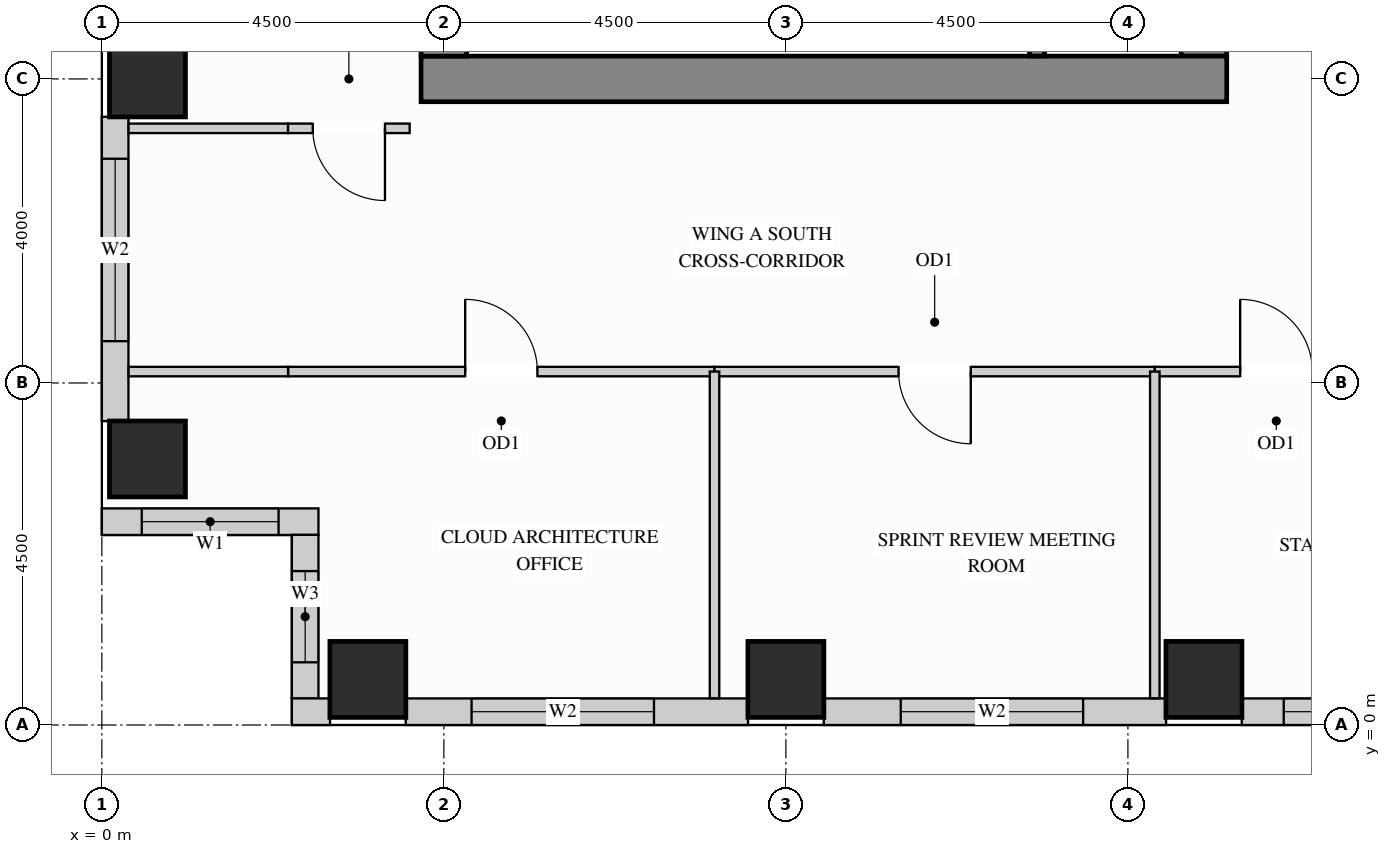
"""IFC4 building model, lengths in metres.
Left out: names, types, materials, properties, quantities, classifications, styles, units other than length and angle.
Written with IfcOpenShell. Run it as: python <this file> out.ifc"""

import sys

from ifc_helpers import new_model, si_unit, direction, frame, frame_2d, origin, origin_2d, place, context, subcontext, project, spatial, rectangle, extrude, source, transform, mapped, element, fill, save


model = new_model("IFC4")
c1 = context("Model", 3, precision=1e-05, world=origin(), true_north=direction((0.0, 1.0)))
c2 = subcontext(c1, "Body", "Model", "MODEL_VIEW")
j1 = project(units=[si_unit("LENGTHUNIT", "METRE"), si_unit("PLANEANGLEUNIT", "RADIAN")], contexts=[c1])
p1 = place(None, origin())
s1 = spatial("IfcSite", under=j1, at=p1, CompositionType="ELEMENT")
p2 = place(p1, origin())
s2 = spatial("IfcBuilding", under=s1, at=p2, CompositionType="ELEMENT")
p3 = place(p2, frame((0.0, 0.0, 193.5)))
s3 = spatial("IfcBuildingStorey", under=s2, at=p3, CompositionType="ELEMENT", Elevation=193.5)
m1 = source(origin(), c2, "Body", "SweptSolid", [
    extrude(rectangle(XDim=1.0, YDim=1.0, at=origin_2d()), origin(), (0.0, 0.0, 1.0), 3.4),
])
for number, where, z_axis, x_axis in (
    (1, (14.5, 0.6, 0.0), (0.0, 0.0, 1.0), (1.0, 0.0, 0.0)),
    (2, (3.5, 0.6, 0.0), (0.0, 0.0, 1.0), (1.0, 0.0, 0.0)),
    (3, (9.0, 0.6, 0.0), (0.0, 0.0, 1.0), (1.0, 0.0, 0.0)),
    (4, (0.6, 3.5, 0.0), (0.0, 0.0, 1.0), (1.0, 0.0, 0.0)),
    (5, (0.6, 8.5, 0.0), (0.0, 0.0, 1.0), (1.0, 0.0, 0.0)),
):
    element("IfcColumn", number, at=place(p3, frame(where, z_axis=z_axis, x_axis=x_axis)), inside=s3, PredefinedType="COLUMN", context=c2, shape_type="MappedRepresentation", body=[
        mapped(m1, transform((0.0, 0.0, 0.0), x_axis=(1.0, 0.0, 0.0), y_axis=(0.0, 1.0, 0.0), z_axis=(0.0, 0.0, 1.0))),
    ])
m2 = source(origin(), c2, "Body", "SweptSolid", [
    extrude(rectangle(XDim=10.02, YDim=0.6, at=frame_2d((5.01, 0.0))), origin(), (0.0, 0.0, 1.0), 3.4),
])
p4 = place(p3, frame((14.5, 8.8, 0.0), z_axis=(0.0, 0.0, 1.0), x_axis=(0.0, 1.0, 0.0)))
e6 = element("IfcWall", 6, at=p4, inside=s3, PredefinedType="SHEAR", context=c2, shape_type="MappedRepresentation", body=[
    mapped(m2, transform((0.0, 0.0, 0.0), x_axis=(1.0, 0.0, 0.0), y_axis=(0.0, 1.0, 0.0), z_axis=(0.0, 0.0, 1.0))),
])
m3 = source(origin(), c2, "Body", "SweptSolid", [
    extrude(rectangle(XDim=10.6, YDim=0.6, at=frame_2d((5.3, 0.0))), origin(), (0.0, 0.0, 1.0), 3.4),
])
p5 = place(p3, frame((4.2, 8.5, 0.0), z_axis=(0.0, 0.0, 1.0), x_axis=(1.0, 0.0, 0.0)))
e7 = element("IfcWall", 7, at=p5, inside=s3, PredefinedType="SHEAR", context=c2, shape_type="MappedRepresentation", body=[
    mapped(m3, transform((0.0, 0.0, 0.0), x_axis=(1.0, 0.0, 0.0), y_axis=(0.0, 1.0, 0.0), z_axis=(0.0, 0.0, 1.0))),
])
m4 = source(origin(), c2, "Body", "SweptSolid", [
    extrude(rectangle(XDim=20.4, YDim=0.6, at=frame_2d((10.2, 0.0))), origin(), (0.0, 0.0, 1.0), 3.4),
])
p6 = place(p3, frame((4.5, 8.8, 0.0), z_axis=(0.0, 0.0, 1.0), x_axis=(0.0, 1.0, 0.0)))
e8 = element("IfcWall", 8, at=p6, inside=s3, PredefinedType="SHEAR", context=c2, shape_type="MappedRepresentation", body=[
    mapped(m4, transform((0.0, 0.0, 0.0), x_axis=(1.0, 0.0, 0.0), y_axis=(0.0, 1.0, 0.0), z_axis=(0.0, 0.0, 1.0))),
])
p7 = place(p3, frame((0.175, 8.002, 0.0), z_axis=(0.0, 0.0, 1.0), x_axis=(0.0, -1.0, 0.0)))
e9 = element("IfcWall", 9, at=p7, inside=s3, PredefinedType="SOLIDWALL", context=c2, shape_type="SweptSolid", body=[
    extrude(rectangle(XDim=4.004, YDim=0.35, at=frame_2d((2.002, 0.0))), origin(), (0.0, 0.0, 1.0), 2.612),
])
p8 = place(p7, frame((0.552, 0.0, 0.78)))
e10 = element("IfcOpeningElement", 10, at=p8, cuts=e9, PredefinedType="OPENING", context=c2, shape_type="SweptSolid", body=[
    extrude(rectangle(XDim=2.4, YDim=1.652, at=frame_2d((1.2, 0.826))), frame((0.0, 0.185, 0.0), z_axis=(0.0, -1.0, 0.0), x_axis=(1.0, 0.0, 0.0)), (0.0, 0.0, 1.0), 0.37),
])
p9 = place(p3, frame((0.0, 2.675, 0.0), z_axis=(0.0, 0.0, 1.0), x_axis=(1.0, 0.0, 0.0)))
e11 = element("IfcWall", 11, at=p9, inside=s3, PredefinedType="SOLIDWALL", context=c2, shape_type="SweptSolid", body=[
    extrude(rectangle(XDim=2.85, YDim=0.35, at=frame_2d((1.425, 0.0))), origin(), (0.0, 0.0, 1.0), 3.385),
])
p10 = place(p9, frame((0.525, 0.0, 0.78)))
e12 = element("IfcOpeningElement", 12, at=p10, cuts=e11, PredefinedType="OPENING", context=c2, shape_type="SweptSolid", body=[
    extrude(rectangle(XDim=1.8, YDim=2.1, at=frame_2d((0.9, 1.05))), frame((0.0, 0.185, 0.0), z_axis=(0.0, -1.0, 0.0), x_axis=(1.0, 0.0, 0.0)), (0.0, 0.0, 1.0), 0.37),
])
p11 = place(p3, frame((2.675, 2.502, 0.0), z_axis=(0.0, 0.0, 1.0), x_axis=(0.0, -1.0, 0.0)))
e13 = element("IfcWall", 13, at=p11, inside=s3, PredefinedType="SOLIDWALL", context=c2, shape_type="SweptSolid", body=[
    extrude(rectangle(XDim=2.154, YDim=0.35, at=frame_2d((1.077, 0.0))), origin(), (0.0, 0.0, 1.0), 3.385),
])
p12 = place(p11, frame((0.477, 0.0, 0.78)))
e14 = element("IfcOpeningElement", 14, at=p12, cuts=e13, PredefinedType="OPENING", context=c2, shape_type="SweptSolid", body=[
    extrude(rectangle(XDim=1.2, YDim=2.1, at=frame_2d((0.6, 1.05))), frame((0.0, 0.185, 0.0), z_axis=(0.0, -1.0, 0.0), x_axis=(1.0, 0.0, 0.0)), (0.0, 0.0, 1.0), 0.37),
])
m5 = source(origin(), c2, "Body", "SweptSolid", [
    extrude(rectangle(XDim=0.502, YDim=0.35, at=frame_2d((0.251, 0.0))), origin(), (0.0, 0.0, 1.0), 3.385),
])
p13 = place(p3, frame((2.5, 0.175, 0.0), z_axis=(0.0, 0.0, 1.0), x_axis=(1.0, 0.0, 0.0)))
e15 = element("IfcWall", 15, at=p13, inside=s3, PredefinedType="SOLIDWALL", context=c2, shape_type="MappedRepresentation", body=[
    mapped(m5, transform((0.0, 0.0, 0.0), x_axis=(1.0, 0.0, 0.0), y_axis=(0.0, 1.0, 0.0), z_axis=(0.0, 0.0, 1.0))),
])
p14 = place(p3, frame((3.998, 0.175, 0.0), z_axis=(0.0, 0.0, 1.0), x_axis=(1.0, 0.0, 0.0)))
e16 = element("IfcWall", 16, at=p14, inside=s3, PredefinedType="SOLIDWALL", context=c2, shape_type="SweptSolid", body=[
    extrude(rectangle(XDim=4.504, YDim=0.35, at=frame_2d((2.252, 0.0))), origin(), (0.0, 0.0, 1.0), 2.612),
])
p15 = place(p14, frame((0.866, 0.0, 0.78)))
e17 = element("IfcOpeningElement", 17, at=p15, cuts=e16, PredefinedType="OPENING", context=c2, shape_type="SweptSolid", body=[
    extrude(rectangle(XDim=2.4, YDim=1.652, at=frame_2d((1.2, 0.826))), frame((0.0, 0.185, 0.0), z_axis=(0.0, -1.0, 0.0), x_axis=(1.0, 0.0, 0.0)), (0.0, 0.0, 1.0), 0.37),
])
p16 = place(p3, frame((9.498, 0.175, 0.0), z_axis=(0.0, 0.0, 1.0), x_axis=(1.0, 0.0, 0.0)))
e18 = element("IfcWall", 18, at=p16, inside=s3, PredefinedType="SOLIDWALL", context=c2, shape_type="SweptSolid", body=[
    extrude(rectangle(XDim=4.504, YDim=0.35, at=frame_2d((2.252, 0.0))), origin(), (0.0, 0.0, 1.0), 2.612),
])
p17 = place(p16, frame((1.013, 0.0, 0.78)))
e19 = element("IfcOpeningElement", 19, at=p17, cuts=e18, PredefinedType="OPENING", context=c2, shape_type="SweptSolid", body=[
    extrude(rectangle(XDim=2.4, YDim=1.652, at=frame_2d((1.2, 0.826))), frame((0.0, 0.185, 0.0), z_axis=(0.0, -1.0, 0.0), x_axis=(1.0, 0.0, 0.0)), (0.0, 0.0, 1.0), 0.37),
])
p18 = place(p3, frame((14.998, 0.175, 0.0), z_axis=(0.0, 0.0, 1.0), x_axis=(1.0, 0.0, 0.0)))
e20 = element("IfcWall", 20, at=p18, inside=s3, PredefinedType="SOLIDWALL", context=c2, shape_type="SweptSolid", body=[
    extrude(rectangle(XDim=3.504, YDim=0.35, at=frame_2d((1.752, 0.0))), origin(), (0.0, 0.0, 1.0), 2.612),
])
p19 = place(p18, frame((0.552, 0.0, 0.78)))
e21 = element("IfcOpeningElement", 21, at=p19, cuts=e20, PredefinedType="OPENING", context=c2, shape_type="SweptSolid", body=[
    extrude(rectangle(XDim=2.4, YDim=1.652, at=frame_2d((1.2, 0.826))), frame((0.0, 0.185, 0.0), z_axis=(0.0, -1.0, 0.0), x_axis=(1.0, 0.0, 0.0)), (0.0, 0.0, 1.0), 0.37),
])
m6 = source(origin(), c2, "Body", "SweptSolid", [
    extrude(rectangle(XDim=2.098, YDim=0.125, at=frame_2d((1.049, 0.0))), origin(), (0.0, 0.0, 1.0), 3.385),
])
p20 = place(p3, frame((0.352, 7.85, 0.0), z_axis=(0.0, 0.0, 1.0), x_axis=(1.0, 0.0, 0.0)))
e22 = element("IfcWall", 22, at=p20, inside=s3, PredefinedType="PARTITIONING", context=c2, shape_type="MappedRepresentation", body=[
    mapped(m6, transform((0.0, 0.0, 0.0), x_axis=(1.0, 0.0, 0.0), y_axis=(0.0, 1.0, 0.0), z_axis=(0.0, 0.0, 1.0))),
])
p21 = place(p3, frame((2.45, 7.85, 0.0), z_axis=(0.0, 0.0, 1.0), x_axis=(1.0, 0.0, 0.0)))
e23 = element("IfcWall", 23, at=p21, inside=s3, PredefinedType="PARTITIONING", context=c2, shape_type="SweptSolid", body=[
    extrude(rectangle(XDim=1.6, YDim=0.125, at=frame_2d((0.8, 0.0))), origin(), (0.0, 0.0, 1.0), 3.385),
])
p22 = place(p21, frame((0.325, 0.0, 0.0)))
e24 = element("IfcOpeningElement", 24, at=p22, cuts=e23, PredefinedType="OPENING", context=c2, shape_type="SweptSolid", body=[
    extrude(rectangle(XDim=0.95, YDim=2.15, at=frame_2d((0.475, 1.075))), frame((0.0, 0.073, 0.0), z_axis=(0.0, -1.0, 0.0), x_axis=(1.0, 0.0, 0.0)), (0.0, 0.0, 1.0), 0.145),
])
p23 = place(p3, frame((2.45, 4.65, 0.0), z_axis=(0.0, 0.0, 1.0), x_axis=(1.0, 0.0, 0.0)))
e25 = element("IfcWall", 25, at=p23, inside=s3, PredefinedType="PARTITIONING", context=c2, shape_type="SweptSolid", body=[
    extrude(rectangle(XDim=5.611, YDim=0.125, at=frame_2d((2.806, 0.0))), origin(), (0.0, 0.0, 1.0), 2.848),
])
p24 = place(p23, frame((2.331, 0.0, 0.0)))
e26 = element("IfcOpeningElement", 26, at=p24, cuts=e25, PredefinedType="OPENING", context=c2, shape_type="SweptSolid", body=[
    extrude(rectangle(XDim=0.95, YDim=2.15, at=frame_2d((0.475, 1.075))), frame((0.0, 0.073, 0.0), z_axis=(0.0, -1.0, 0.0), x_axis=(1.0, 0.0, 0.0)), (0.0, 0.0, 1.0), 0.145),
])
p25 = place(p3, frame((8.061, 4.65, 0.0), z_axis=(0.0, 0.0, 1.0), x_axis=(1.0, 0.0, 0.0)))
e27 = element("IfcWall", 27, at=p25, inside=s3, PredefinedType="PARTITIONING", context=c2, shape_type="SweptSolid", body=[
    extrude(rectangle(XDim=5.793, YDim=0.125, at=frame_2d((2.896, 0.0))), origin(), (0.0, 0.0, 1.0), 2.848),
])
p26 = place(p25, frame((2.421, 0.0, 0.0)))
e28 = element("IfcOpeningElement", 28, at=p26, cuts=e27, PredefinedType="OPENING", context=c2, shape_type="SweptSolid", body=[
    extrude(rectangle(XDim=0.95, YDim=2.15, at=frame_2d((0.475, 1.075))), frame((0.0, 0.073, 0.0), z_axis=(0.0, -1.0, 0.0), x_axis=(1.0, 0.0, 0.0)), (0.0, 0.0, 1.0), 0.145),
])
p27 = place(p3, frame((13.854, 4.65, 0.0), z_axis=(0.0, 0.0, 1.0), x_axis=(1.0, 0.0, 0.0)))
e29 = element("IfcWall", 29, at=p27, inside=s3, PredefinedType="PARTITIONING", context=c2, shape_type="SweptSolid", body=[
    extrude(rectangle(XDim=3.196, YDim=0.125, at=frame_2d((1.598, 0.0))), origin(), (0.0, 0.0, 1.0), 2.848),
])
p28 = place(p27, frame((1.123, 0.0, 0.0)))
e30 = element("IfcOpeningElement", 30, at=p28, cuts=e29, PredefinedType="OPENING", context=c2, shape_type="SweptSolid", body=[
    extrude(rectangle(XDim=0.95, YDim=2.15, at=frame_2d((0.475, 1.075))), frame((0.0, 0.073, 0.0), z_axis=(0.0, -1.0, 0.0), x_axis=(1.0, 0.0, 0.0)), (0.0, 0.0, 1.0), 0.145),
])
m7 = source(origin(), c2, "Body", "SweptSolid", [
    extrude(rectangle(XDim=2.098, YDim=0.125, at=frame_2d((1.049, 0.0))), origin(), (0.0, 0.0, 1.0), 2.848),
])
p29 = place(p3, frame((0.352, 4.65, 0.0), z_axis=(0.0, 0.0, 1.0), x_axis=(1.0, 0.0, 0.0)))
e31 = element("IfcWall", 31, at=p29, inside=s3, PredefinedType="PARTITIONING", context=c2, shape_type="MappedRepresentation", body=[
    mapped(m7, transform((0.0, 0.0, 0.0), x_axis=(1.0, 0.0, 0.0), y_axis=(0.0, 1.0, 0.0), z_axis=(0.0, 0.0, 1.0))),
])
m8 = source(origin(), c2, "Body", "SweptSolid", [
    extrude(rectangle(XDim=4.298, YDim=0.125, at=frame_2d((2.149, 0.0))), origin(), (0.0, 0.0, 1.0), 3.385),
])
for number, where, z_axis, x_axis in (
    (32, (8.061, 0.352, 0.0), (0.0, 0.0, 1.0), (0.0, 1.0, 0.0)),
    (33, (13.854, 0.352, 0.0), (0.0, 0.0, 1.0), (0.0, 1.0, 0.0)),
):
    element("IfcWall", number, at=place(p3, frame(where, z_axis=z_axis, x_axis=x_axis)), inside=s3, PredefinedType="PARTITIONING", context=c2, shape_type="MappedRepresentation", body=[
        mapped(m8, transform((0.0, 0.0, 0.0), x_axis=(1.0, 0.0, 0.0), y_axis=(0.0, 1.0, 0.0), z_axis=(0.0, 0.0, 1.0))),
    ])
m9 = source(origin(), c2, "Body", "SweptSolid", [
    extrude(rectangle(XDim=3.753, YDim=0.2, at=frame_2d((1.876, 0.0))), origin(), (0.0, 0.0, 1.0), 3.4),
])
p30 = place(p3, frame((12.305, 8.802, 0.0), z_axis=(0.0, 0.0, 1.0), x_axis=(0.0, 1.0, 0.0)))
e34 = element("IfcWall", 34, at=p30, inside=s3, PredefinedType="SHEAR", context=c2, shape_type="MappedRepresentation", body=[
    mapped(m9, transform((0.0, 0.0, 0.0), x_axis=(1.0, 0.0, 0.0), y_axis=(0.0, 1.0, 0.0), z_axis=(0.0, 0.0, 1.0))),
])
m10 = source(origin(), c2, "Body", "SweptSolid", [
    extrude(rectangle(XDim=0.95, YDim=2.15, at=frame_2d((0.475, 1.075))), frame((0.0, 0.025, 0.0), z_axis=(0.0, -1.0, 0.0), x_axis=(1.0, 0.0, 0.0)), (0.0, 0.0, 1.0), 0.05),
])
p31 = place(p24, origin())
e35 = element("IfcDoor", 35, at=p31, inside=s3, OperationType="SINGLE_SWING_LEFT", PredefinedType="DOOR", context=c2, shape_type="MappedRepresentation", body=[
    mapped(m10, transform((0.0, 0.0, 0.0), x_axis=(1.0, 0.0, 0.0), y_axis=(0.0, 1.0, 0.0), z_axis=(0.0, 0.0, 1.0))),
])
fill(e26, e35)
p32 = place(p26, origin())
e36 = element("IfcDoor", 36, at=p32, inside=s3, OperationType="SINGLE_SWING_RIGHT", PredefinedType="DOOR", context=c2, shape_type="MappedRepresentation", body=[
    mapped(m10, transform((0.0, 0.0, 0.0), x_axis=(1.0, 0.0, 0.0), y_axis=(0.0, 1.0, 0.0), z_axis=(0.0, 0.0, 1.0))),
])
fill(e28, e36)
p33 = place(p28, origin())
e37 = element("IfcDoor", 37, at=p33, inside=s3, OperationType="SINGLE_SWING_LEFT", PredefinedType="DOOR", context=c2, shape_type="MappedRepresentation", body=[
    mapped(m10, transform((0.0, 0.0, 0.0), x_axis=(1.0, 0.0, 0.0), y_axis=(0.0, 1.0, 0.0), z_axis=(0.0, 0.0, 1.0))),
])
fill(e30, e37)
p34 = place(p22, origin())
e38 = element("IfcDoor", 38, at=p34, inside=s3, OperationType="SINGLE_SWING_RIGHT", PredefinedType="DOOR", context=c2, shape_type="MappedRepresentation", body=[
    mapped(m10, transform((0.0, 0.0, 0.0), x_axis=(1.0, 0.0, 0.0), y_axis=(0.0, 1.0, 0.0), z_axis=(0.0, 0.0, 1.0))),
])
fill(e24, e38)
m11 = source(origin(), c2, "Body", "SweptSolid", [
    extrude(rectangle(XDim=1.8, YDim=2.1, at=frame_2d((0.9, 1.05))), frame((0.0, 0.03, 0.0), z_axis=(0.0, -1.0, 0.0), x_axis=(1.0, 0.0, 0.0)), (0.0, 0.0, 1.0), 0.06),
])
p35 = place(p10, origin())
e39 = element("IfcWindow", 39, at=p35, inside=s3, PartitioningType="SINGLE_PANEL", PredefinedType="WINDOW", context=c2, shape_type="MappedRepresentation", body=[
    mapped(m11, transform((0.0, 0.0, 0.0), x_axis=(1.0, 0.0, 0.0), y_axis=(0.0, 1.0, 0.0), z_axis=(0.0, 0.0, 1.0))),
])
fill(e12, e39)
m12 = source(origin(), c2, "Body", "SweptSolid", [
    extrude(rectangle(XDim=2.4, YDim=1.652, at=frame_2d((1.2, 0.826))), frame((0.0, 0.03, 0.0), z_axis=(0.0, -1.0, 0.0), x_axis=(1.0, 0.0, 0.0)), (0.0, 0.0, 1.0), 0.06),
])
p36 = place(p8, origin())
e40 = element("IfcWindow", 40, at=p36, inside=s3, PartitioningType="SINGLE_PANEL", PredefinedType="WINDOW", context=c2, shape_type="MappedRepresentation", body=[
    mapped(m12, transform((0.0, 0.0, 0.0), x_axis=(1.0, 0.0, 0.0), y_axis=(0.0, 1.0, 0.0), z_axis=(0.0, 0.0, 1.0))),
])
fill(e10, e40)
p37 = place(p15, origin())
e41 = element("IfcWindow", 41, at=p37, inside=s3, PartitioningType="SINGLE_PANEL", PredefinedType="WINDOW", context=c2, shape_type="MappedRepresentation", body=[
    mapped(m12, transform((0.0, 0.0, 0.0), x_axis=(1.0, 0.0, 0.0), y_axis=(0.0, 1.0, 0.0), z_axis=(0.0, 0.0, 1.0))),
])
fill(e17, e41)
p38 = place(p17, origin())
e42 = element("IfcWindow", 42, at=p38, inside=s3, PartitioningType="SINGLE_PANEL", PredefinedType="WINDOW", context=c2, shape_type="MappedRepresentation", body=[
    mapped(m12, transform((0.0, 0.0, 0.0), x_axis=(1.0, 0.0, 0.0), y_axis=(0.0, 1.0, 0.0), z_axis=(0.0, 0.0, 1.0))),
])
fill(e19, e42)
p39 = place(p19, origin())
e43 = element("IfcWindow", 43, at=p39, inside=s3, PartitioningType="SINGLE_PANEL", PredefinedType="WINDOW", context=c2, shape_type="MappedRepresentation", body=[
    mapped(m12, transform((0.0, 0.0, 0.0), x_axis=(1.0, 0.0, 0.0), y_axis=(0.0, 1.0, 0.0), z_axis=(0.0, 0.0, 1.0))),
])
fill(e21, e43)
m13 = source(origin(), c2, "Body", "SweptSolid", [
    extrude(rectangle(XDim=1.2, YDim=2.1, at=frame_2d((0.6, 1.05))), frame((0.0, 0.03, 0.0), z_axis=(0.0, -1.0, 0.0), x_axis=(1.0, 0.0, 0.0)), (0.0, 0.0, 1.0), 0.06),
])
p40 = place(p12, origin())
e44 = element("IfcWindow", 44, at=p40, inside=s3, PartitioningType="SINGLE_PANEL", PredefinedType="WINDOW", context=c2, shape_type="MappedRepresentation", body=[
    mapped(m13, transform((0.0, 0.0, 0.0), x_axis=(1.0, 0.0, 0.0), y_axis=(0.0, 1.0, 0.0), z_axis=(0.0, 0.0, 1.0))),
])
fill(e14, e44)
save(model, sys.argv[1])
